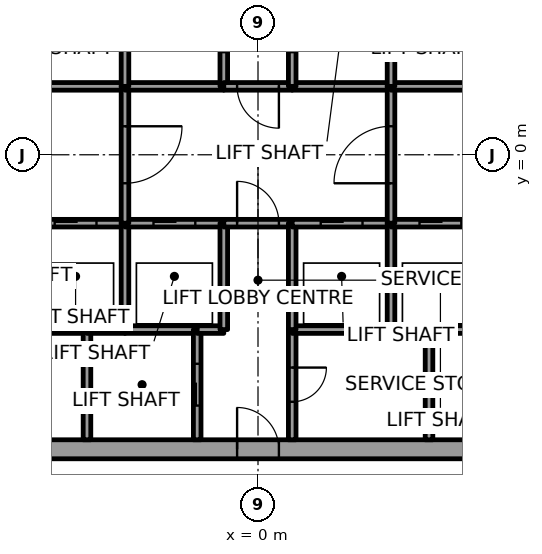
"""IFC4 building model, lengths in metres.
Left out: names, types, materials, properties, quantities, classifications, styles, units other than length and angle.
Written with IfcOpenShell. Run it as: python <this file> out.ifc"""

import sys

from ifc_helpers import new_model, si_unit, direction, frame, frame_2d, origin, place, context, subcontext, project, spatial, rectangle, extrude, element, fill, save


model = new_model("IFC4")
c1 = context("Model", 3, precision=1e-05, world=origin(), true_north=direction((0.0, 1.0)))
c2 = subcontext(c1, "Body", "Model", "MODEL_VIEW")
j1 = project(units=[si_unit("LENGTHUNIT", "METRE"), si_unit("PLANEANGLEUNIT", "RADIAN")], contexts=[c1])
p1 = place(None, origin())
s1 = spatial("IfcSite", under=j1, at=p1, CompositionType="ELEMENT")
p2 = place(p1, origin())
s2 = spatial("IfcBuilding", under=s1, at=p2, CompositionType="ELEMENT")
p3 = place(p2, frame((0.0, 0.0, 107.2)))
s3 = spatial("IfcBuildingStorey", under=s2, at=p3, CompositionType="ELEMENT", Elevation=107.2)
p4 = place(p3, frame((-11.0, -7.75, 0.0), z_axis=(0.0, 0.0, 1.0), x_axis=(1.0, 0.0, 0.0)))
e1 = element("IfcWall", 1, at=p4, inside=s3, PredefinedType="SHEAR", context=c2, shape_type="SweptSolid", body=[
    extrude(rectangle(XDim=22.0, YDim=0.5, at=frame_2d((11.0, 0.0))), origin(), (0.0, 0.0, 1.0), 5.4),
])
p5 = place(p4, frame((10.45, 0.0, 0.0)))
e2 = element("IfcOpeningElement", 2, at=p5, cuts=e1, PredefinedType="OPENING", context=c2, shape_type="SweptSolid", body=[
    extrude(rectangle(XDim=1.1, YDim=2.1, at=frame_2d((0.55, 1.05))), frame((0.0, 0.25, 0.0), z_axis=(0.0, -1.0, 0.0), x_axis=(1.0, 0.0, 0.0)), (0.0, 0.0, 1.0), 0.5),
])
p6 = place(p3, frame((-6.1, -4.6, 0.0), z_axis=(0.0, 0.0, 1.0), x_axis=(1.0, 0.0, 0.0)))
e3 = element("IfcWall", 3, at=p6, inside=s3, PredefinedType="SOLIDWALL", context=c2, shape_type="SweptSolid", body=[
    extrude(rectangle(XDim=1.6, YDim=0.2, at=frame_2d((0.8, 0.0))), origin(), (0.0, 0.0, 1.0), 5.25),
])
p7 = place(p3, frame((-6.1, -1.8, 0.0), z_axis=(0.0, 0.0, 1.0), x_axis=(1.0, 0.0, 0.0)))
e4 = element("IfcWall", 4, at=p7, inside=s3, PredefinedType="SOLIDWALL", context=c2, shape_type="SweptSolid", body=[
    extrude(rectangle(XDim=2.6, YDim=0.2, at=frame_2d((1.3, 0.0))), origin(), (0.0, 0.0, 1.0), 5.25),
])
p8 = place(p7, frame((0.75, 0.0, 0.0)))
e5 = element("IfcOpeningElement", 5, at=p8, cuts=e4, PredefinedType="OPENING", context=c2, shape_type="SweptSolid", body=[
    extrude(rectangle(XDim=1.1, YDim=2.1, at=frame_2d((0.55, 1.05))), frame((0.0, 0.1, 0.0), z_axis=(0.0, -1.0, 0.0), x_axis=(1.0, 0.0, 0.0)), (0.0, 0.0, 1.0), 0.2),
])
p9 = place(p3, frame((-3.5, 1.8, 0.0), z_axis=(0.0, 0.0, 1.0), x_axis=(-1.0, 0.0, 0.0)))
e6 = element("IfcWall", 6, at=p9, inside=s3, PredefinedType="SOLIDWALL", context=c2, shape_type="SweptSolid", body=[
    extrude(rectangle(XDim=2.6, YDim=0.2, at=frame_2d((1.3, 0.0))), origin(), (0.0, 0.0, 1.0), 5.25),
])
p10 = place(p3, frame((-4.5, -4.6, 0.0), z_axis=(0.0, 0.0, 1.0), x_axis=(0.0, -1.0, 0.0)))
e7 = element("IfcWall", 7, at=p10, inside=s3, PredefinedType="SOLIDWALL", context=c2, shape_type="SweptSolid", body=[
    extrude(rectangle(XDim=2.9, YDim=0.2, at=frame_2d((1.45, 0.0))), origin(), (0.0, 0.0, 1.0), 5.25),
])
p11 = place(p3, frame((-4.5, -4.6, 0.0), z_axis=(0.0, 0.0, 1.0), x_axis=(1.0, 0.0, 0.0)))
e8 = element("IfcWall", 8, at=p11, inside=s3, PredefinedType="SOLIDWALL", context=c2, shape_type="SweptSolid", body=[
    extrude(rectangle(XDim=1.0, YDim=0.2, at=frame_2d((0.5, 0.0))), origin(), (0.0, 0.0, 1.0), 5.25),
])
p12 = place(p3, frame((-3.5, -4.6, 0.0), z_axis=(0.0, 0.0, 1.0), x_axis=(1.0, 0.0, 0.0)))
e9 = element("IfcWall", 9, at=p12, inside=s3, PredefinedType="SOLIDWALL", context=c2, shape_type="SweptSolid", body=[
    extrude(rectangle(XDim=1.9, YDim=0.2, at=frame_2d((0.95, 0.0))), origin(), (0.0, 0.0, 1.0), 5.25),
])
p13 = place(p3, frame((-3.5, -4.6, 0.0), z_axis=(0.0, 0.0, 1.0), x_axis=(0.0, 1.0, 0.0)))
e10 = element("IfcWall", 10, at=p13, inside=s3, PredefinedType="SOLIDWALL", context=c2, shape_type="SweptSolid", body=[
    extrude(rectangle(XDim=2.8, YDim=0.2, at=frame_2d((1.4, 0.0))), origin(), (0.0, 0.0, 1.0), 5.25),
])
p14 = place(p3, frame((-3.5, -1.8, 0.0), z_axis=(0.0, 0.0, 1.0), x_axis=(1.0, 0.0, 0.0)))
e11 = element("IfcWall", 11, at=p14, inside=s3, PredefinedType="SOLIDWALL", context=c2, shape_type="SweptSolid", body=[
    extrude(rectangle(XDim=2.6, YDim=0.2, at=frame_2d((1.3, 0.0))), origin(), (0.0, 0.0, 1.0), 5.25),
])
p15 = place(p14, frame((0.75, 0.0, 0.0)))
e12 = element("IfcOpeningElement", 12, at=p15, cuts=e11, PredefinedType="OPENING", context=c2, shape_type="SweptSolid", body=[
    extrude(rectangle(XDim=1.1, YDim=2.1, at=frame_2d((0.55, 1.05))), frame((0.0, 0.1, 0.0), z_axis=(0.0, -1.0, 0.0), x_axis=(1.0, 0.0, 0.0)), (0.0, 0.0, 1.0), 0.2),
])
p16 = place(p3, frame((-3.5, 1.8, 0.0), z_axis=(0.0, 0.0, 1.0), x_axis=(0.0, -1.0, 0.0)))
e13 = element("IfcWall", 13, at=p16, inside=s3, PredefinedType="SOLIDWALL", context=c2, shape_type="SweptSolid", body=[
    extrude(rectangle(XDim=3.6, YDim=0.2, at=frame_2d((1.8, 0.0))), origin(), (0.0, 0.0, 1.0), 5.25),
])
p17 = place(p16, frame((1.05, 0.0, 0.0)))
e14 = element("IfcOpeningElement", 14, at=p17, cuts=e13, PredefinedType="OPENING", context=c2, shape_type="SweptSolid", body=[
    extrude(rectangle(XDim=1.5, YDim=2.1, at=frame_2d((0.75, 1.05))), frame((0.0, 0.1, 0.0), z_axis=(0.0, -1.0, 0.0), x_axis=(1.0, 0.0, 0.0)), (0.0, 0.0, 1.0), 0.2),
])
p18 = place(p3, frame((-0.9, 1.8, 0.0), z_axis=(0.0, 0.0, 1.0), x_axis=(-1.0, 0.0, 0.0)))
e15 = element("IfcWall", 15, at=p18, inside=s3, PredefinedType="SOLIDWALL", context=c2, shape_type="SweptSolid", body=[
    extrude(rectangle(XDim=2.6, YDim=0.2, at=frame_2d((1.3, 0.0))), origin(), (0.0, 0.0, 1.0), 5.25),
])
p19 = place(p3, frame((-3.5, 4.6, 0.0), z_axis=(0.0, 0.0, 1.0), x_axis=(0.0, -1.0, 0.0)))
e16 = element("IfcWall", 16, at=p19, inside=s3, PredefinedType="SOLIDWALL", context=c2, shape_type="SweptSolid", body=[
    extrude(rectangle(XDim=2.8, YDim=0.2, at=frame_2d((1.4, 0.0))), origin(), (0.0, 0.0, 1.0), 5.25),
])
p20 = place(p3, frame((-0.9, 1.8, 0.0), z_axis=(0.0, 0.0, 1.0), x_axis=(0.0, 1.0, 0.0)))
e17 = element("IfcWall", 17, at=p20, inside=s3, PredefinedType="SOLIDWALL", context=c2, shape_type="SweptSolid", body=[
    extrude(rectangle(XDim=3.0, YDim=0.2, at=frame_2d((1.5, 0.0))), origin(), (0.0, 0.0, 1.0), 5.25),
])
p21 = place(p20, frame((0.9, 0.0, 0.0)))
e18 = element("IfcOpeningElement", 18, at=p21, cuts=e17, PredefinedType="OPENING", context=c2, shape_type="SweptSolid", body=[
    extrude(rectangle(XDim=1.2, YDim=2.1, at=frame_2d((0.6, 1.05))), frame((0.0, 0.1, 0.0), z_axis=(0.0, -1.0, 0.0), x_axis=(1.0, 0.0, 0.0)), (0.0, 0.0, 1.0), 0.2),
])
p22 = place(p3, frame((-1.6, -7.5, 0.0), z_axis=(0.0, 0.0, 1.0), x_axis=(0.0, 1.0, 0.0)))
e19 = element("IfcWall", 19, at=p22, inside=s3, PredefinedType="SOLIDWALL", context=c2, shape_type="SweptSolid", body=[
    extrude(rectangle(XDim=2.9, YDim=0.2, at=frame_2d((1.45, 0.0))), origin(), (0.0, 0.0, 1.0), 5.25),
])
p23 = place(p22, frame((0.9, 0.0, 0.0)))
e20 = element("IfcOpeningElement", 20, at=p23, cuts=e19, PredefinedType="OPENING", context=c2, shape_type="SweptSolid", body=[
    extrude(rectangle(XDim=1.1, YDim=2.1, at=frame_2d((0.55, 1.05))), frame((0.0, 0.1, 0.0), z_axis=(0.0, -1.0, 0.0), x_axis=(1.0, 0.0, 0.0)), (0.0, 0.0, 1.0), 0.2),
])
p24 = place(p3, frame((-1.6, -4.6, 0.0), z_axis=(0.0, 0.0, 1.0), x_axis=(1.0, 0.0, 0.0)))
e21 = element("IfcWall", 21, at=p24, inside=s3, PredefinedType="SOLIDWALL", context=c2, shape_type="SweptSolid", body=[
    extrude(rectangle(XDim=0.7, YDim=0.2, at=frame_2d((0.35, 0.0))), origin(), (0.0, 0.0, 1.0), 5.25),
])
p25 = place(p3, frame((-0.9, -4.6, 0.0), z_axis=(0.0, 0.0, 1.0), x_axis=(0.0, 1.0, 0.0)))
e22 = element("IfcWall", 22, at=p25, inside=s3, PredefinedType="SOLIDWALL", context=c2, shape_type="SweptSolid", body=[
    extrude(rectangle(XDim=2.8, YDim=0.2, at=frame_2d((1.4, 0.0))), origin(), (0.0, 0.0, 1.0), 5.25),
])
p26 = place(p3, frame((-0.9, -1.8, 0.0), z_axis=(0.0, 0.0, 1.0), x_axis=(1.0, 0.0, 0.0)))
e23 = element("IfcWall", 23, at=p26, inside=s3, PredefinedType="SOLIDWALL", context=c2, shape_type="SweptSolid", body=[
    extrude(rectangle(XDim=1.8, YDim=0.2, at=frame_2d((0.9, 0.0))), origin(), (0.0, 0.0, 1.0), 5.25),
])
p27 = place(p26, frame((0.35, 0.0, 0.0)))
e24 = element("IfcOpeningElement", 24, at=p27, cuts=e23, PredefinedType="OPENING", context=c2, shape_type="SweptSolid", body=[
    extrude(rectangle(XDim=1.1, YDim=2.1, at=frame_2d((0.55, 1.05))), frame((0.0, 0.1, 0.0), z_axis=(0.0, -1.0, 0.0), x_axis=(1.0, 0.0, 0.0)), (0.0, 0.0, 1.0), 0.2),
])
p28 = place(p3, frame((0.9, 1.8, 0.0), z_axis=(0.0, 0.0, 1.0), x_axis=(-1.0, 0.0, 0.0)))
e25 = element("IfcWall", 25, at=p28, inside=s3, PredefinedType="SOLIDWALL", context=c2, shape_type="SweptSolid", body=[
    extrude(rectangle(XDim=1.8, YDim=0.2, at=frame_2d((0.9, 0.0))), origin(), (0.0, 0.0, 1.0), 5.25),
])
p29 = place(p28, frame((0.35, 0.0, 0.0)))
e26 = element("IfcOpeningElement", 26, at=p29, cuts=e25, PredefinedType="OPENING", context=c2, shape_type="SweptSolid", body=[
    extrude(rectangle(XDim=1.1, YDim=2.1, at=frame_2d((0.55, 1.05))), frame((0.0, 0.1, 0.0), z_axis=(0.0, -1.0, 0.0), x_axis=(1.0, 0.0, 0.0)), (0.0, 0.0, 1.0), 0.2),
])
p30 = place(p3, frame((0.9, -4.6, 0.0), z_axis=(0.0, 0.0, 1.0), x_axis=(0.0, -1.0, 0.0)))
e27 = element("IfcWall", 27, at=p30, inside=s3, PredefinedType="SOLIDWALL", context=c2, shape_type="SweptSolid", body=[
    extrude(rectangle(XDim=2.9, YDim=0.2, at=frame_2d((1.45, 0.0))), origin(), (0.0, 0.0, 1.0), 5.25),
])
p31 = place(p30, frame((1.0, 0.0, 0.0)))
e28 = element("IfcOpeningElement", 28, at=p31, cuts=e27, PredefinedType="OPENING", context=c2, shape_type="SweptSolid", body=[
    extrude(rectangle(XDim=0.9, YDim=2.1, at=frame_2d((0.45, 1.05))), frame((0.0, 0.1, 0.0), z_axis=(0.0, -1.0, 0.0), x_axis=(1.0, 0.0, 0.0)), (0.0, 0.0, 1.0), 0.2),
])
p32 = place(p3, frame((3.5, -4.6, 0.0), z_axis=(0.0, 0.0, 1.0), x_axis=(-1.0, 0.0, 0.0)))
e29 = element("IfcWall", 29, at=p32, inside=s3, PredefinedType="SOLIDWALL", context=c2, shape_type="SweptSolid", body=[
    extrude(rectangle(XDim=2.6, YDim=0.2, at=frame_2d((1.3, 0.0))), origin(), (0.0, 0.0, 1.0), 5.25),
])
p33 = place(p3, frame((0.9, -1.8, 0.0), z_axis=(0.0, 0.0, 1.0), x_axis=(0.0, -1.0, 0.0)))
e30 = element("IfcWall", 30, at=p33, inside=s3, PredefinedType="SOLIDWALL", context=c2, shape_type="SweptSolid", body=[
    extrude(rectangle(XDim=2.8, YDim=0.2, at=frame_2d((1.4, 0.0))), origin(), (0.0, 0.0, 1.0), 5.25),
])
p34 = place(p3, frame((0.9, -1.8, 0.0), z_axis=(0.0, 0.0, 1.0), x_axis=(1.0, 0.0, 0.0)))
e31 = element("IfcWall", 31, at=p34, inside=s3, PredefinedType="SOLIDWALL", context=c2, shape_type="SweptSolid", body=[
    extrude(rectangle(XDim=2.6, YDim=0.2, at=frame_2d((1.3, 0.0))), origin(), (0.0, 0.0, 1.0), 5.25),
])
p35 = place(p34, frame((0.75, 0.0, 0.0)))
e32 = element("IfcOpeningElement", 32, at=p35, cuts=e31, PredefinedType="OPENING", context=c2, shape_type="SweptSolid", body=[
    extrude(rectangle(XDim=1.1, YDim=2.1, at=frame_2d((0.55, 1.05))), frame((0.0, 0.1, 0.0), z_axis=(0.0, -1.0, 0.0), x_axis=(1.0, 0.0, 0.0)), (0.0, 0.0, 1.0), 0.2),
])
p36 = place(p3, frame((3.5, 1.8, 0.0), z_axis=(0.0, 0.0, 1.0), x_axis=(-1.0, 0.0, 0.0)))
e33 = element("IfcWall", 33, at=p36, inside=s3, PredefinedType="SOLIDWALL", context=c2, shape_type="SweptSolid", body=[
    extrude(rectangle(XDim=2.6, YDim=0.2, at=frame_2d((1.3, 0.0))), origin(), (0.0, 0.0, 1.0), 5.25),
])
p37 = place(p3, frame((0.9, 4.8, 0.0), z_axis=(0.0, 0.0, 1.0), x_axis=(0.0, -1.0, 0.0)))
e34 = element("IfcWall", 34, at=p37, inside=s3, PredefinedType="SOLIDWALL", context=c2, shape_type="SweptSolid", body=[
    extrude(rectangle(XDim=3.0, YDim=0.2, at=frame_2d((1.5, 0.0))), origin(), (0.0, 0.0, 1.0), 5.25),
])
p38 = place(p37, frame((0.9, 0.0, 0.0)))
e35 = element("IfcOpeningElement", 35, at=p38, cuts=e34, PredefinedType="OPENING", context=c2, shape_type="SweptSolid", body=[
    extrude(rectangle(XDim=1.2, YDim=2.1, at=frame_2d((0.6, 1.05))), frame((0.0, 0.1, 0.0), z_axis=(0.0, -1.0, 0.0), x_axis=(1.0, 0.0, 0.0)), (0.0, 0.0, 1.0), 0.2),
])
p39 = place(p3, frame((4.5, -4.6, 0.0), z_axis=(0.0, 0.0, 1.0), x_axis=(-1.0, 0.0, 0.0)))
e36 = element("IfcWall", 36, at=p39, inside=s3, PredefinedType="SOLIDWALL", context=c2, shape_type="SweptSolid", body=[
    extrude(rectangle(XDim=1.0, YDim=0.2, at=frame_2d((0.5, 0.0))), origin(), (0.0, 0.0, 1.0), 5.25),
])
p40 = place(p3, frame((3.5, -4.6, 0.0), z_axis=(0.0, 0.0, 1.0), x_axis=(0.0, 1.0, 0.0)))
e37 = element("IfcWall", 37, at=p40, inside=s3, PredefinedType="SOLIDWALL", context=c2, shape_type="SweptSolid", body=[
    extrude(rectangle(XDim=2.8, YDim=0.2, at=frame_2d((1.4, 0.0))), origin(), (0.0, 0.0, 1.0), 5.25),
])
p41 = place(p3, frame((3.5, -1.8, 0.0), z_axis=(0.0, 0.0, 1.0), x_axis=(1.0, 0.0, 0.0)))
e38 = element("IfcWall", 38, at=p41, inside=s3, PredefinedType="SOLIDWALL", context=c2, shape_type="SweptSolid", body=[
    extrude(rectangle(XDim=2.6, YDim=0.2, at=frame_2d((1.3, 0.0))), origin(), (0.0, 0.0, 1.0), 5.25),
])
p42 = place(p41, frame((0.75, 0.0, 0.0)))
e39 = element("IfcOpeningElement", 39, at=p42, cuts=e38, PredefinedType="OPENING", context=c2, shape_type="SweptSolid", body=[
    extrude(rectangle(XDim=1.1, YDim=2.1, at=frame_2d((0.55, 1.05))), frame((0.0, 0.1, 0.0), z_axis=(0.0, -1.0, 0.0), x_axis=(1.0, 0.0, 0.0)), (0.0, 0.0, 1.0), 0.2),
])
p43 = place(p3, frame((3.5, -1.8, 0.0), z_axis=(0.0, 0.0, 1.0), x_axis=(0.0, 1.0, 0.0)))
e40 = element("IfcWall", 40, at=p43, inside=s3, PredefinedType="SOLIDWALL", context=c2, shape_type="SweptSolid", body=[
    extrude(rectangle(XDim=3.6, YDim=0.2, at=frame_2d((1.8, 0.0))), origin(), (0.0, 0.0, 1.0), 5.25),
])
p44 = place(p43, frame((1.05, 0.0, 0.0)))
e41 = element("IfcOpeningElement", 41, at=p44, cuts=e40, PredefinedType="OPENING", context=c2, shape_type="SweptSolid", body=[
    extrude(rectangle(XDim=1.5, YDim=2.1, at=frame_2d((0.75, 1.05))), frame((0.0, 0.1, 0.0), z_axis=(0.0, -1.0, 0.0), x_axis=(1.0, 0.0, 0.0)), (0.0, 0.0, 1.0), 0.2),
])
p45 = place(p3, frame((6.1, 1.8, 0.0), z_axis=(0.0, 0.0, 1.0), x_axis=(-1.0, 0.0, 0.0)))
e42 = element("IfcWall", 42, at=p45, inside=s3, PredefinedType="SOLIDWALL", context=c2, shape_type="SweptSolid", body=[
    extrude(rectangle(XDim=2.6, YDim=0.2, at=frame_2d((1.3, 0.0))), origin(), (0.0, 0.0, 1.0), 5.25),
])
p46 = place(p3, frame((3.5, 1.8, 0.0), z_axis=(0.0, 0.0, 1.0), x_axis=(0.0, 1.0, 0.0)))
e43 = element("IfcWall", 43, at=p46, inside=s3, PredefinedType="SOLIDWALL", context=c2, shape_type="SweptSolid", body=[
    extrude(rectangle(XDim=2.8, YDim=0.2, at=frame_2d((1.4, 0.0))), origin(), (0.0, 0.0, 1.0), 5.25),
])
p47 = place(p3, frame((4.5, -7.5, 0.0), z_axis=(0.0, 0.0, 1.0), x_axis=(0.0, 1.0, 0.0)))
e44 = element("IfcWall", 44, at=p47, inside=s3, PredefinedType="SOLIDWALL", context=c2, shape_type="SweptSolid", body=[
    extrude(rectangle(XDim=2.9, YDim=0.2, at=frame_2d((1.45, 0.0))), origin(), (0.0, 0.0, 1.0), 5.25),
])
p48 = place(p3, frame((4.5, -4.6, 0.0), z_axis=(0.0, 0.0, 1.0), x_axis=(1.0, 0.0, 0.0)))
e45 = element("IfcWall", 45, at=p48, inside=s3, PredefinedType="SOLIDWALL", context=c2, shape_type="SweptSolid", body=[
    extrude(rectangle(XDim=1.6, YDim=0.2, at=frame_2d((0.8, 0.0))), origin(), (0.0, 0.0, 1.0), 5.25),
])
p49 = place(p8, origin())
e46 = element("IfcDoor", 46, at=p49, inside=s3, OperationType="SLIDING_TO_RIGHT", PredefinedType="DOOR", context=c2, shape_type="SweptSolid", body=[
    extrude(rectangle(XDim=1.1, YDim=2.1, at=frame_2d((0.55, 1.05))), frame((0.0, 0.025, 0.0), z_axis=(0.0, -1.0, 0.0), x_axis=(1.0, 0.0, 0.0)), (0.0, 0.0, 1.0), 0.05),
])
fill(e5, e46)
p50 = place(p15, origin())
e47 = element("IfcDoor", 47, at=p50, inside=s3, OperationType="SLIDING_TO_RIGHT", PredefinedType="DOOR", context=c2, shape_type="SweptSolid", body=[
    extrude(rectangle(XDim=1.1, YDim=2.1, at=frame_2d((0.55, 1.05))), frame((0.0, 0.025, 0.0), z_axis=(0.0, -1.0, 0.0), x_axis=(1.0, 0.0, 0.0)), (0.0, 0.0, 1.0), 0.05),
])
fill(e12, e47)
p51 = place(p35, origin())
e48 = element("IfcDoor", 48, at=p51, inside=s3, OperationType="SLIDING_TO_RIGHT", PredefinedType="DOOR", context=c2, shape_type="SweptSolid", body=[
    extrude(rectangle(XDim=1.1, YDim=2.1, at=frame_2d((0.55, 1.05))), frame((0.0, 0.025, 0.0), z_axis=(0.0, -1.0, 0.0), x_axis=(1.0, 0.0, 0.0)), (0.0, 0.0, 1.0), 0.05),
])
fill(e32, e48)
p52 = place(p42, origin())
e49 = element("IfcDoor", 49, at=p52, inside=s3, OperationType="SLIDING_TO_LEFT", PredefinedType="DOOR", context=c2, shape_type="SweptSolid", body=[
    extrude(rectangle(XDim=1.1, YDim=2.1, at=frame_2d((0.55, 1.05))), frame((0.0, 0.025, 0.0), z_axis=(0.0, -1.0, 0.0), x_axis=(1.0, 0.0, 0.0)), (0.0, 0.0, 1.0), 0.05),
])
fill(e39, e49)
p53 = place(p23, origin())
e50 = element("IfcDoor", 50, at=p53, inside=s3, OperationType="SLIDING_TO_RIGHT", PredefinedType="DOOR", context=c2, shape_type="SweptSolid", body=[
    extrude(rectangle(XDim=1.1, YDim=2.1, at=frame_2d((0.55, 1.05))), frame((0.0, 0.025, 0.0), z_axis=(0.0, -1.0, 0.0), x_axis=(1.0, 0.0, 0.0)), (0.0, 0.0, 1.0), 0.05),
])
fill(e20, e50)
p54 = place(p17, origin())
e51 = element("IfcDoor", 51, at=p54, inside=s3, OperationType="DOUBLE_DOOR_SINGLE_SWING", PredefinedType="DOOR", context=c2, shape_type="SweptSolid", body=[
    extrude(rectangle(XDim=1.5, YDim=2.1, at=frame_2d((0.75, 1.05))), frame((0.0, 0.025, 0.0), z_axis=(0.0, -1.0, 0.0), x_axis=(1.0, 0.0, 0.0)), (0.0, 0.0, 1.0), 0.05),
])
fill(e14, e51)
p55 = place(p44, origin())
e52 = element("IfcDoor", 52, at=p55, inside=s3, OperationType="DOUBLE_DOOR_SINGLE_SWING", PredefinedType="DOOR", context=c2, shape_type="SweptSolid", body=[
    extrude(rectangle(XDim=1.5, YDim=2.1, at=frame_2d((0.75, 1.05))), frame((0.0, 0.025, 0.0), z_axis=(0.0, -1.0, 0.0), x_axis=(1.0, 0.0, 0.0)), (0.0, 0.0, 1.0), 0.05),
])
fill(e41, e52)
p56 = place(p29, origin())
e53 = element("IfcDoor", 53, at=p56, inside=s3, OperationType="SINGLE_SWING_LEFT", PredefinedType="DOOR", context=c2, shape_type="SweptSolid", body=[
    extrude(rectangle(XDim=1.1, YDim=2.1, at=frame_2d((0.55, 1.05))), frame((0.0, 0.025, 0.0), z_axis=(0.0, -1.0, 0.0), x_axis=(1.0, 0.0, 0.0)), (0.0, 0.0, 1.0), 0.05),
])
fill(e26, e53)
p57 = place(p27, origin())
e54 = element("IfcDoor", 54, at=p57, inside=s3, OperationType="SINGLE_SWING_LEFT", PredefinedType="DOOR", context=c2, shape_type="SweptSolid", body=[
    extrude(rectangle(XDim=1.1, YDim=2.1, at=frame_2d((0.55, 1.05))), frame((0.0, 0.025, 0.0), z_axis=(0.0, -1.0, 0.0), x_axis=(1.0, 0.0, 0.0)), (0.0, 0.0, 1.0), 0.05),
])
fill(e24, e54)
p58 = place(p31, origin())
e55 = element("IfcDoor", 55, at=p58, inside=s3, OperationType="SINGLE_SWING_LEFT", PredefinedType="DOOR", context=c2, shape_type="SweptSolid", body=[
    extrude(rectangle(XDim=0.9, YDim=2.1, at=frame_2d((0.45, 1.05))), frame((0.0, 0.025, 0.0), z_axis=(0.0, -1.0, 0.0), x_axis=(1.0, 0.0, 0.0)), (0.0, 0.0, 1.0), 0.05),
])
fill(e28, e55)
p59 = place(p5, origin())
e56 = element("IfcDoor", 56, at=p59, inside=s3, OperationType="SINGLE_SWING_RIGHT", PredefinedType="DOOR", context=c2, shape_type="SweptSolid", body=[
    extrude(rectangle(XDim=1.1, YDim=2.1, at=frame_2d((0.55, 1.05))), frame((0.0, 0.025, 0.0), z_axis=(0.0, -1.0, 0.0), x_axis=(1.0, 0.0, 0.0)), (0.0, 0.0, 1.0), 0.05),
])
fill(e2, e56)
save(model, sys.argv[1])
